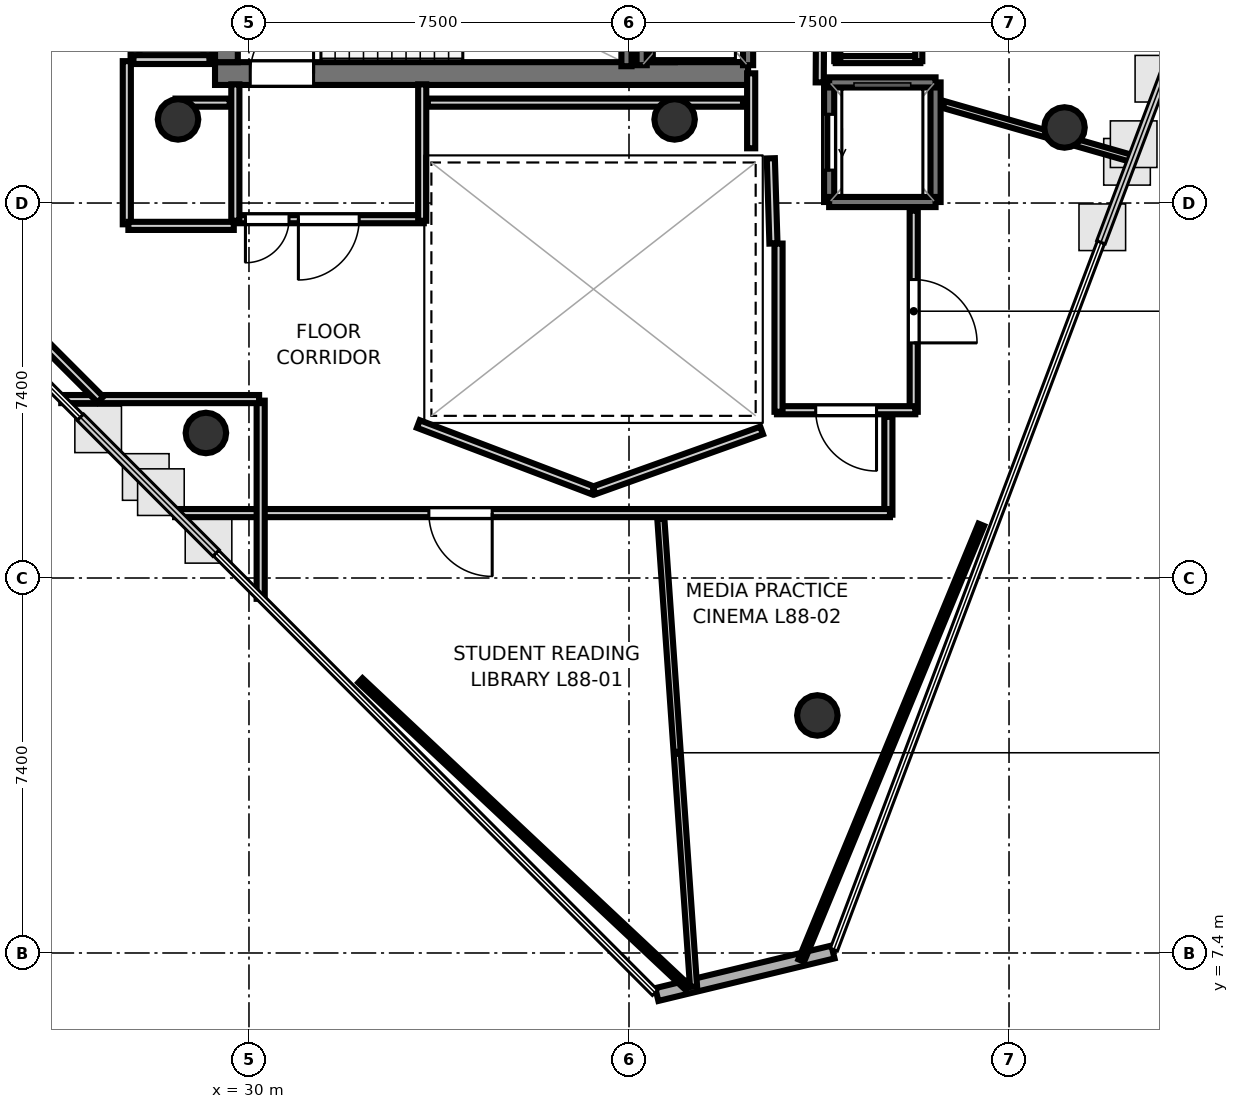
"""IFC4 building model, lengths in metres.
Left out: names, types, materials, properties, quantities, classifications, styles, units other than length and angle.
Written with IfcOpenShell. Run it as: python <this file> out.ifc"""

import sys

from ifc_helpers import new_model, si_unit, direction, frame, frame_2d, origin, origin_2d, place, context, subcontext, project, spatial, rectangle, hollow_circle, extrude, element, fill, save


model = new_model("IFC4")
c1 = context("Model", 3, precision=1e-05, world=origin(), true_north=direction((0.0, 1.0)))
c2 = subcontext(c1, "Body", "Model", "MODEL_VIEW")
j1 = project(units=[si_unit("LENGTHUNIT", "METRE"), si_unit("PLANEANGLEUNIT", "RADIAN")], contexts=[c1])
p1 = place(None, origin())
s1 = spatial("IfcSite", under=j1, at=p1, CompositionType="ELEMENT")
p2 = place(p1, origin())
s2 = spatial("IfcBuilding", under=s1, at=p2, CompositionType="ELEMENT")
p3 = place(p2, frame((0.0, 0.0, 340.7)))
s3 = spatial("IfcBuildingStorey", under=s2, at=p3, CompositionType="ELEMENT", Elevation=340.7)
p4 = place(p3, frame((29.33, 24.755, 0.0), z_axis=(0.0, 0.0, 1.0), x_axis=(1.0, 0.0, 0.0)))
e1 = element("IfcWall", 1, at=p4, inside=s3, PredefinedType="SHEAR", context=c2, shape_type="SweptSolid", body=[
    extrude(rectangle(XDim=10.52, YDim=0.45, at=frame_2d((5.26, 0.0))), origin(), (0.0, 0.0, 1.0), 3.52),
])
p5 = place(p4, frame((0.695, 0.0, 0.0)))
e2 = element("IfcOpeningElement", 2, at=p5, cuts=e1, PredefinedType="OPENING", context=c2, shape_type="SweptSolid", body=[
    extrude(rectangle(XDim=1.25, YDim=2.15, at=frame_2d((0.625, 1.075))), frame((0.0, 0.235, 0.0), z_axis=(0.0, -1.0, 0.0), x_axis=(1.0, 0.0, 0.0)), (0.0, 0.0, 1.0), 0.47),
])
for number, where, z_axis, x_axis in (
    (3, (29.555, 24.98, 0.0), (0.0, 0.0, 1.0), (0.0, 1.0, 0.0)),
    (4, (38.18, 24.98, 0.0), (0.0, 0.0, 1.0), (0.0, 1.0, 0.0)),
):
    element("IfcWall", number, at=place(p3, frame(where, z_axis=z_axis, x_axis=x_axis)), inside=s3, PredefinedType="SHEAR", context=c2, shape_type="SweptSolid", body=[
        extrude(rectangle(XDim=7.44, YDim=0.45, at=frame_2d((3.72, 0.0))), origin(), (0.0, 0.0, 1.0), 3.52),
    ])
for number, where, z_axis, x_axis in (
    (5, (28.6, 23.85, 0.0), (0.0, 0.0, 1.0), (1.0, 0.0, 0.0)),
    (6, (38.4, 23.85, 0.0), (0.0, 0.0, 1.0), (1.0, 0.0, 0.0)),
    (7, (29.15, 17.662, 0.0), (0.0, 0.0, 1.0), (1.0, 0.0, 0.0)),
    (8, (41.217, 12.088, 0.0), (0.0, 0.0, 1.0), (1.0, 0.0, 0.0)),
    (9, (46.095, 23.691, 0.0), (0.0, 0.0, 1.0), (1.0, 0.0, 0.0)),
):
    element("IfcColumn", number, at=place(p3, frame(where, z_axis=z_axis, x_axis=x_axis)), inside=s3, PredefinedType="COLUMN", context=c2, shape_type="SweptSolid", body=[
        extrude(hollow_circle(Radius=0.4, WallThickness=0.022, at=origin_2d()), origin(), (0.0, 0.0, 1.0), 3.7),
    ])
p6 = place(p3, frame((38.049, 6.58, 0.0), z_axis=(0.0, 0.0, 1.0), x_axis=(0.972070395477, 0.234689467672, 0.0)))
e10 = element("IfcWall", 10, at=p6, inside=s3, PredefinedType="SOLIDWALL", context=c2, shape_type="SweptSolid", body=[
    extrude(rectangle(XDim=3.576, YDim=0.26, at=frame_2d((1.788, 0.0))), origin(), (0.0, 0.0, 1.0), 3.52),
])
p7 = place(p3, frame((37.45, 24.9, 0.0), z_axis=(0.0, 0.0, 1.0), x_axis=(0.0, 1.0, 0.0)))
e11 = element("IfcWall", 11, at=p7, inside=s3, PredefinedType="SOLIDWALL", context=c2, shape_type="SweptSolid", body=[
    extrude(rectangle(XDim=3.06, YDim=0.2, at=frame_2d((1.53, 0.0))), origin(), (0.0, 0.0, 1.0), 3.52),
])
p8 = place(p3, frame((39.85, 24.92, 0.0), z_axis=(0.0, 0.0, 1.0), x_axis=(0.0, 1.0, 0.0)))
e12 = element("IfcWall", 12, at=p8, inside=s3, PredefinedType="SOLIDWALL", context=c2, shape_type="SweptSolid", body=[
    extrude(rectangle(XDim=2.36, YDim=0.2, at=frame_2d((1.18, 0.0))), origin(), (0.0, 0.0, 1.0), 3.52),
])
p9 = place(p8, frame((0.63, 0.0, 0.0)))
e13 = element("IfcOpeningElement", 13, at=p9, cuts=e12, PredefinedType="OPENING", context=c2, shape_type="SweptSolid", body=[
    extrude(rectangle(XDim=1.1, YDim=2.15, at=frame_2d((0.55, 1.075))), frame((0.0, 0.11, 0.0), z_axis=(0.0, -1.0, 0.0), x_axis=(1.0, 0.0, 0.0)), (0.0, 0.0, 1.0), 0.22),
])
for number, where, z_axis, x_axis in (
    (14, (37.75, 24.92, 0.0), (0.0, 0.0, 1.0), (0.0, 1.0, 0.0)),
    (15, (43.55, 22.22, 0.0), (0.0, 0.0, 1.0), (0.0, 1.0, 0.0)),
):
    element("IfcWall", number, at=place(p3, frame(where, z_axis=z_axis, x_axis=x_axis)), inside=s3, PredefinedType="SOLIDWALL", context=c2, shape_type="SweptSolid", body=[
        extrude(rectangle(XDim=2.36, YDim=0.2, at=frame_2d((1.18, 0.0))), origin(), (0.0, 0.0, 1.0), 3.52),
    ])
p10 = place(p3, frame((41.45, 22.22, 0.0), z_axis=(0.0, 0.0, 1.0), x_axis=(0.0, 1.0, 0.0)))
e16 = element("IfcWall", 16, at=p10, inside=s3, PredefinedType="SOLIDWALL", context=c2, shape_type="SweptSolid", body=[
    extrude(rectangle(XDim=2.36, YDim=0.2, at=frame_2d((1.18, 0.0))), origin(), (0.0, 0.0, 1.0), 3.52),
])
p11 = place(p10, frame((0.63, 0.0, 0.0)))
e17 = element("IfcOpeningElement", 17, at=p11, cuts=e16, PredefinedType="OPENING", context=c2, shape_type="SweptSolid", body=[
    extrude(rectangle(XDim=1.1, YDim=2.15, at=frame_2d((0.55, 1.075))), frame((0.0, 0.11, 0.0), z_axis=(0.0, -1.0, 0.0), x_axis=(1.0, 0.0, 0.0)), (0.0, 0.0, 1.0), 0.22),
])
for number, where, z_axis, x_axis in (
    (18, (41.45, 24.58, 0.0), (0.0, 0.0, 1.0), (1.0, 0.0, 0.0)),
    (19, (41.45, 22.22, 0.0), (0.0, 0.0, 1.0), (1.0, 0.0, 0.0)),
):
    element("IfcWall", number, at=place(p3, frame(where, z_axis=z_axis, x_axis=x_axis)), inside=s3, PredefinedType="SOLIDWALL", context=c2, shape_type="SweptSolid", body=[
        extrude(rectangle(XDim=2.1, YDim=0.2, at=frame_2d((1.05, 0.0))), origin(), (0.0, 0.0, 1.0), 3.52),
    ])
p12 = place(p3, frame((33.45, 21.881, 0.0), z_axis=(0.0, 0.0, 1.0), x_axis=(-1.0, 0.0, 0.0)))
e20 = element("IfcWall", 20, at=p12, inside=s3, PredefinedType="PARTITIONING", context=c2, shape_type="SweptSolid", body=[
    extrude(rectangle(XDim=3.75, YDim=0.16, at=frame_2d((1.875, 0.0))), origin(), (0.0, 0.0, 1.0), 2.84),
])
p13 = place(p12, frame((1.275, 0.0, 0.0)))
e21 = element("IfcOpeningElement", 21, at=p13, cuts=e20, PredefinedType="OPENING", context=c2, shape_type="SweptSolid", body=[
    extrude(rectangle(XDim=1.2, YDim=2.15, at=frame_2d((0.6, 1.075))), frame((0.0, 0.09, 0.0), z_axis=(0.0, -1.0, 0.0), x_axis=(1.0, 0.0, 0.0)), (0.0, 0.0, 1.0), 0.18),
])
p14 = place(p12, frame((2.66, 0.0, 0.0)))
e22 = element("IfcOpeningElement", 22, at=p14, cuts=e20, PredefinedType="OPENING", context=c2, shape_type="SweptSolid", body=[
    extrude(rectangle(XDim=0.86, YDim=2.05, at=frame_2d((0.43, 1.025))), frame((0.0, 0.09, 0.0), z_axis=(0.0, -1.0, 0.0), x_axis=(1.0, 0.0, 0.0)), (0.0, 0.0, 1.0), 0.18),
])
for number, where, z_axis, x_axis in (
    (23, (29.731, 21.85, 0.0), (0.0, 0.0, 1.0), (0.0, 1.0, 0.0)),
    (24, (33.419, 24.542, 0.0), (0.0, 0.0, 1.0), (0.0, -1.0, 0.0)),
):
    element("IfcWall", number, at=place(p3, frame(where, z_axis=z_axis, x_axis=x_axis)), inside=s3, PredefinedType="PARTITIONING", context=c2, shape_type="SweptSolid", body=[
        extrude(rectangle(XDim=2.692, YDim=0.16, at=frame_2d((1.346, 0.0))), origin(), (0.0, 0.0, 1.0), 2.84),
    ])
p15 = place(p3, frame((40.351, 21.401, 0.0), z_axis=(0.0, 0.0, 1.0), x_axis=(-0.031058045979, 0.999517582527, 0.0)))
e25 = element("IfcWall", 25, at=p15, inside=s3, PredefinedType="PARTITIONING", context=c2, shape_type="SweptSolid", body=[
    extrude(rectangle(XDim=1.682, YDim=0.16, at=frame_2d((0.841, 0.0))), origin(), (0.0, 0.0, 1.0), 2.84),
])
p16 = place(p3, frame((39.911, 23.28, 0.0), z_axis=(0.0, 0.0, 1.0), x_axis=(0.0, 1.0, 0.0)))
e26 = element("IfcWall", 26, at=p16, inside=s3, PredefinedType="PARTITIONING", context=c2, shape_type="SweptSolid", body=[
    extrude(rectangle(XDim=1.48, YDim=0.16, at=frame_2d((0.74, 0.0))), origin(), (0.0, 0.0, 1.0), 2.84),
])
p17 = place(p3, frame((41.313, 32.92, 0.0), z_axis=(0.0, 0.0, 1.0), x_axis=(-0.005942518022, -0.999982343084, 0.0)))
e27 = element("IfcWall", 27, at=p17, inside=s3, PredefinedType="PARTITIONING", context=c2, shape_type="SweptSolid", body=[
    extrude(rectangle(XDim=8.34, YDim=0.16, at=frame_2d((4.17, 0.0))), origin(), (0.0, 0.0, 1.0), 2.84),
])
p18 = place(p3, frame((43.119, 22.05, 0.0), z_axis=(0.0, 0.0, 1.0), x_axis=(0.0, -1.0, 0.0)))
e28 = element("IfcWall", 28, at=p18, inside=s3, PredefinedType="PARTITIONING", context=c2, shape_type="SweptSolid", body=[
    extrude(rectangle(XDim=3.97, YDim=0.16, at=frame_2d((1.985, 0.0))), origin(), (0.0, 0.0, 1.0), 2.84),
])
p19 = place(p18, frame((1.36, 0.0, 0.0)))
e29 = element("IfcOpeningElement", 29, at=p19, cuts=e28, PredefinedType="OPENING", context=c2, shape_type="SweptSolid", body=[
    extrude(rectangle(XDim=1.25, YDim=2.2, at=frame_2d((0.625, 1.1))), frame((0.0, 0.09, 0.0), z_axis=(0.0, -1.0, 0.0), x_axis=(1.0, 0.0, 0.0)), (0.0, 0.0, 1.0), 0.18),
])
p20 = place(p3, frame((43.15, 18.111, 0.0), z_axis=(0.0, 0.0, 1.0), x_axis=(-1.0, 0.0, 0.0)))
e30 = element("IfcWall", 30, at=p20, inside=s3, PredefinedType="PARTITIONING", context=c2, shape_type="SweptSolid", body=[
    extrude(rectangle(XDim=2.73, YDim=0.16, at=frame_2d((1.365, 0.0))), origin(), (0.0, 0.0, 1.0), 2.84),
])
p21 = place(p20, frame((0.765, 0.0, 0.0)))
e31 = element("IfcOpeningElement", 31, at=p21, cuts=e30, PredefinedType="OPENING", context=c2, shape_type="SweptSolid", body=[
    extrude(rectangle(XDim=1.2, YDim=2.15, at=frame_2d((0.6, 1.075))), frame((0.0, 0.09, 0.0), z_axis=(0.0, -1.0, 0.0), x_axis=(1.0, 0.0, 0.0)), (0.0, 0.0, 1.0), 0.18),
])
p22 = place(p3, frame((40.451, 18.08, 0.0), z_axis=(0.0, 0.0, 1.0), x_axis=(0.0, 1.0, 0.0)))
e32 = element("IfcWall", 32, at=p22, inside=s3, PredefinedType="PARTITIONING", context=c2, shape_type="SweptSolid", body=[
    extrude(rectangle(XDim=3.32, YDim=0.16, at=frame_2d((1.66, 0.0))), origin(), (0.0, 0.0, 1.0), 2.84),
])
p23 = place(p3, frame((43.25, 25.031, 0.0), z_axis=(0.0, 0.0, 1.0), x_axis=(-1.0, 0.0, 0.0)))
e33 = element("IfcWall", 33, at=p23, inside=s3, PredefinedType="PARTITIONING", context=c2, shape_type="SweptSolid", body=[
    extrude(rectangle(XDim=1.67, YDim=0.14, at=frame_2d((0.835, 0.0))), origin(), (0.0, 0.0, 1.0), 2.84),
])
p24 = place(p3, frame((41.611, 25.0, 0.0), z_axis=(0.0, 0.0, 1.0), x_axis=(0.0, 1.0, 0.0)))
e34 = element("IfcWall", 34, at=p24, inside=s3, PredefinedType="PARTITIONING", context=c2, shape_type="SweptSolid", body=[
    extrude(rectangle(XDim=2.95, YDim=0.12, at=frame_2d((1.475, 0.0))), origin(), (0.0, 0.0, 1.0), 2.84),
])
p25 = place(p3, frame((43.219, 27.95, 0.0), z_axis=(0.0, 0.0, 1.0), x_axis=(0.0, -1.0, 0.0)))
e35 = element("IfcWall", 35, at=p25, inside=s3, PredefinedType="PARTITIONING", context=c2, shape_type="SweptSolid", body=[
    extrude(rectangle(XDim=2.95, YDim=0.14, at=frame_2d((1.475, 0.0))), origin(), (0.0, 0.0, 1.0), 2.84),
])
p26 = place(p25, frame((0.985, 0.0, 0.0)))
e36 = element("IfcOpeningElement", 36, at=p26, cuts=e35, PredefinedType="OPENING", context=c2, shape_type="SweptSolid", body=[
    extrude(rectangle(XDim=0.98, YDim=2.1, at=frame_2d((0.49, 1.05))), frame((0.0, 0.08, 0.0), z_axis=(0.0, -1.0, 0.0), x_axis=(1.0, 0.0, 0.0)), (0.0, 0.0, 1.0), 0.16),
])
p27 = place(p3, frame((27.751, 25.0, 0.0), z_axis=(0.0, 0.0, 1.0), x_axis=(0.0, 1.0, 0.0)))
e37 = element("IfcWall", 37, at=p27, inside=s3, PredefinedType="PLUMBINGWALL", context=c2, shape_type="SweptSolid", body=[
    extrude(rectangle(XDim=4.12, YDim=0.175, at=frame_2d((2.06, 0.0))), origin(), (0.0, 0.0, 1.0), 2.84),
])
p28 = place(p27, frame((1.61, 0.0, 0.0)))
e38 = element("IfcOpeningElement", 38, at=p28, cuts=e37, PredefinedType="OPENING", context=c2, shape_type="SweptSolid", body=[
    extrude(rectangle(XDim=0.9, YDim=2.1, at=frame_2d((0.45, 1.05))), frame((0.0, 0.097, 0.0), z_axis=(0.0, -1.0, 0.0), x_axis=(1.0, 0.0, 0.0)), (0.0, 0.0, 1.0), 0.195),
])
p29 = place(p3, frame((29.189, 29.12, 0.0), z_axis=(0.0, 0.0, 1.0), x_axis=(0.0, -1.0, 0.0)))
e39 = element("IfcWall", 39, at=p29, inside=s3, PredefinedType="PLUMBINGWALL", context=c2, shape_type="SweptSolid", body=[
    extrude(rectangle(XDim=4.12, YDim=0.175, at=frame_2d((2.06, 0.0))), origin(), (0.0, 0.0, 1.0), 2.84),
])
p30 = place(p3, frame((29.22, 25.031, 0.0), z_axis=(0.0, 0.0, 1.0), x_axis=(-1.0, 0.0, 0.0)))
e40 = element("IfcWall", 40, at=p30, inside=s3, PredefinedType="PLUMBINGWALL", context=c2, shape_type="SweptSolid", body=[
    extrude(rectangle(XDim=1.5, YDim=0.175, at=frame_2d((0.75, 0.0))), origin(), (0.0, 0.0, 1.0), 2.84),
])
p31 = place(p3, frame((29.62, 24.181, 0.0), z_axis=(0.0, 0.0, 1.0), x_axis=(-1.0, 0.0, 0.0)))
e41 = element("IfcWall", 41, at=p31, inside=s3, PredefinedType="PARTITIONING", context=c2, shape_type="SweptSolid", body=[
    extrude(rectangle(XDim=1.07, YDim=0.16, at=frame_2d((0.535, 0.0))), origin(), (0.0, 0.0, 1.0), 2.84),
])
p32 = place(p3, frame((39.75, 24.181, 0.0), z_axis=(0.0, 0.0, 1.0), x_axis=(-1.0, 0.0, 0.0)))
e42 = element("IfcWall", 42, at=p32, inside=s3, PredefinedType="PARTITIONING", context=c2, shape_type="SweptSolid", body=[
    extrude(rectangle(XDim=6.22, YDim=0.16, at=frame_2d((3.11, 0.0))), origin(), (0.0, 0.0, 1.0), 2.84),
])
p33 = place(p3, frame((36.81, 16.529, 0.0), z_axis=(0.0, 0.0, 1.0), x_axis=(0.941548344365, 0.33687789364, 0.0)))
e43 = element("IfcWall", 43, at=p33, inside=s3, PredefinedType="PARTITIONING", context=c2, shape_type="SweptSolid", body=[
    extrude(rectangle(XDim=3.513, YDim=0.16, at=frame_2d((1.756, 0.0))), origin(), (0.0, 0.0, 1.0), 2.84),
])
p34 = place(p3, frame((42.619, 17.98, 0.0), z_axis=(0.0, 0.0, 1.0), x_axis=(0.0, -1.0, 0.0)))
e44 = element("IfcWall", 44, at=p34, inside=s3, PredefinedType="PARTITIONING", context=c2, shape_type="SweptSolid", body=[
    extrude(rectangle(XDim=1.93, YDim=0.16, at=frame_2d((0.965, 0.0))), origin(), (0.0, 0.0, 1.0), 2.84),
])
p35 = place(p3, frame((42.65, 16.081, 0.0), z_axis=(0.0, 0.0, 1.0), x_axis=(-1.0, 0.0, 0.0)))
e45 = element("IfcWall", 45, at=p35, inside=s3, PredefinedType="PARTITIONING", context=c2, shape_type="SweptSolid", body=[
    extrude(rectangle(XDim=14.108, YDim=0.16, at=frame_2d((7.054, 0.0))), origin(), (0.0, 0.0, 1.0), 2.84),
])
p36 = place(p35, frame((7.85, 0.0, 0.0)))
e46 = element("IfcOpeningElement", 46, at=p36, cuts=e45, PredefinedType="OPENING", context=c2, shape_type="SweptSolid", body=[
    extrude(rectangle(XDim=1.25, YDim=2.2, at=frame_2d((0.625, 1.1))), frame((0.0, 0.09, 0.0), z_axis=(0.0, -1.0, 0.0), x_axis=(1.0, 0.0, 0.0)), (0.0, 0.0, 1.0), 0.18),
])
p37 = place(p3, frame((30.231, 14.389, 0.0), z_axis=(0.0, 0.0, 1.0), x_axis=(0.0, 1.0, 0.0)))
e47 = element("IfcWall", 47, at=p37, inside=s3, PredefinedType="PARTITIONING", context=c2, shape_type="SweptSolid", body=[
    extrude(rectangle(XDim=3.911, YDim=0.16, at=frame_2d((1.955, 0.0))), origin(), (0.0, 0.0, 1.0), 2.84),
])
p38 = place(p3, frame((30.2, 18.331, 0.0), z_axis=(0.0, 0.0, 1.0), x_axis=(-1.0, 0.0, 0.0)))
e48 = element("IfcWall", 48, at=p38, inside=s3, PredefinedType="PARTITIONING", context=c2, shape_type="SweptSolid", body=[
    extrude(rectangle(XDim=3.905, YDim=0.16, at=frame_2d((1.953, 0.0))), origin(), (0.0, 0.0, 1.0), 2.84),
])
p39 = place(p3, frame((27.067, 18.322, 0.0), z_axis=(0.0, 0.0, 1.0), x_axis=(-0.706612041623, 0.707601174839, 0.0)))
e49 = element("IfcWall", 49, at=p39, inside=s3, PredefinedType="PARTITIONING", context=c2, shape_type="SweptSolid", body=[
    extrude(rectangle(XDim=1.975, YDim=0.16, at=frame_2d((0.987, 0.0))), origin(), (0.0, 0.0, 1.0), 2.84),
])
p40 = place(p3, frame((27.589, 25.0, 0.0), z_axis=(0.0, 0.0, 1.0), x_axis=(0.0, -1.0, 0.0)))
e50 = element("IfcWall", 50, at=p40, inside=s3, PredefinedType="PARTITIONING", context=c2, shape_type="SweptSolid", body=[
    extrude(rectangle(XDim=3.22, YDim=0.16, at=frame_2d((1.61, 0.0))), origin(), (0.0, 0.0, 1.0), 2.84),
])
p41 = place(p3, frame((27.62, 21.749, 0.0), z_axis=(0.0, 0.0, 1.0), x_axis=(1.0, 0.0, 0.0)))
e51 = element("IfcWall", 51, at=p41, inside=s3, PredefinedType="PARTITIONING", context=c2, shape_type="SweptSolid", body=[
    extrude(rectangle(XDim=2.08, YDim=0.16, at=frame_2d((1.04, 0.0))), origin(), (0.0, 0.0, 1.0), 2.84),
])
p42 = place(p3, frame((33.342, 17.839, 0.0), z_axis=(0.0, 0.0, 1.0), x_axis=(0.93476643205, -0.355262885076, 0.0)))
e52 = element("IfcWall", 52, at=p42, inside=s3, PredefinedType="PARTITIONING", context=c2, shape_type="SweptSolid", body=[
    extrude(rectangle(XDim=3.688, YDim=0.16, at=frame_2d((1.844, 0.0))), origin(), (0.0, 0.0, 1.0), 2.84),
])
p43 = place(p3, frame((38.128, 15.968, 0.0), z_axis=(0.0, 0.0, 1.0), x_axis=(0.06974355432, -0.99756495359, 0.0)))
e53 = element("IfcWall", 53, at=p43, inside=s3, PredefinedType="PARTITIONING", context=c2, shape_type="SweptSolid", body=[
    extrude(rectangle(XDim=9.255, YDim=0.14, at=frame_2d((4.628, 0.0))), origin(), (0.0, 0.0, 1.0), 2.84),
])
p44 = place(p3, frame((38.662, 6.711, 0.0), z_axis=(0.0, 0.0, 1.0), x_axis=(-0.729077520638, 0.684431127946, 0.0)))
e54 = element("IfcWall", 54, at=p44, inside=s3, PredefinedType="PARTITIONING", context=c2, shape_type="SweptSolid", body=[
    extrude(rectangle(XDim=8.864, YDim=0.12, at=frame_2d((4.432, 0.0))), origin(), (0.0, 0.0, 1.0), 2.84),
])
p45 = place(p3, frame((43.711, 24.143, 0.0), z_axis=(0.0, 0.0, 1.0), x_axis=(0.9612562867, -0.275656219374, 0.0)))
e55 = element("IfcWall", 55, at=p45, inside=s3, PredefinedType="PARTITIONING", context=c2, shape_type="SweptSolid", body=[
    extrude(rectangle(XDim=3.896, YDim=0.14, at=frame_2d((1.948, 0.0))), origin(), (0.0, 0.0, 1.0), 2.84),
])
p46 = place(p3, frame((44.453, 15.85, 0.0), z_axis=(0.0, 0.0, 1.0), x_axis=(-0.381841049449, -0.924228009181, 0.0)))
e56 = element("IfcWall", 56, at=p46, inside=s3, PredefinedType="PARTITIONING", context=c2, shape_type="SweptSolid", body=[
    extrude(rectangle(XDim=9.303, YDim=0.12, at=frame_2d((4.652, 0.0))), origin(), (0.0, 0.0, 1.0), 2.84),
])
p47 = place(p5, origin())
e57 = element("IfcDoor", 57, at=p47, inside=s3, OperationType="SINGLE_SWING_RIGHT", PredefinedType="DOOR", context=c2, shape_type="SweptSolid", body=[
    extrude(rectangle(XDim=1.25, YDim=2.15, at=frame_2d((0.625, 1.075))), frame((0.0, 0.025, 0.0), z_axis=(0.0, -1.0, 0.0), x_axis=(1.0, 0.0, 0.0)), (0.0, 0.0, 1.0), 0.05),
])
fill(e2, e57)
p48 = place(p11, origin())
e58 = element("IfcDoor", 58, at=p48, inside=s3, OperationType="SLIDING_TO_LEFT", PredefinedType="DOOR", context=c2, shape_type="SweptSolid", body=[
    extrude(rectangle(XDim=1.1, YDim=2.15, at=frame_2d((0.55, 1.075))), frame((0.0, 0.025, 0.0), z_axis=(0.0, -1.0, 0.0), x_axis=(1.0, 0.0, 0.0)), (0.0, 0.0, 1.0), 0.05),
])
fill(e17, e58)
p49 = place(p13, origin())
e59 = element("IfcDoor", 59, at=p49, inside=s3, OperationType="SINGLE_SWING_RIGHT", PredefinedType="DOOR", context=c2, shape_type="SweptSolid", body=[
    extrude(rectangle(XDim=1.2, YDim=2.15, at=frame_2d((0.6, 1.075))), frame((0.0, 0.025, 0.0), z_axis=(0.0, -1.0, 0.0), x_axis=(1.0, 0.0, 0.0)), (0.0, 0.0, 1.0), 0.05),
])
fill(e21, e59)
p50 = place(p21, origin())
e60 = element("IfcDoor", 60, at=p50, inside=s3, OperationType="SINGLE_SWING_LEFT", PredefinedType="DOOR", context=c2, shape_type="SweptSolid", body=[
    extrude(rectangle(XDim=1.2, YDim=2.15, at=frame_2d((0.6, 1.075))), frame((0.0, 0.025, 0.0), z_axis=(0.0, -1.0, 0.0), x_axis=(1.0, 0.0, 0.0)), (0.0, 0.0, 1.0), 0.05),
])
fill(e31, e60)
p51 = place(p14, origin())
e61 = element("IfcDoor", 61, at=p51, inside=s3, OperationType="SINGLE_SWING_RIGHT", PredefinedType="DOOR", context=c2, shape_type="SweptSolid", body=[
    extrude(rectangle(XDim=0.86, YDim=2.05, at=frame_2d((0.43, 1.025))), frame((0.0, 0.025, 0.0), z_axis=(0.0, -1.0, 0.0), x_axis=(1.0, 0.0, 0.0)), (0.0, 0.0, 1.0), 0.05),
])
fill(e22, e61)
p52 = place(p36, origin())
e62 = element("IfcDoor", 62, at=p52, inside=s3, OperationType="SINGLE_SWING_LEFT", PredefinedType="DOOR", context=c2, shape_type="SweptSolid", body=[
    extrude(rectangle(XDim=1.25, YDim=2.2, at=frame_2d((0.625, 1.1))), frame((0.0, 0.025, 0.0), z_axis=(0.0, -1.0, 0.0), x_axis=(1.0, 0.0, 0.0)), (0.0, 0.0, 1.0), 0.05),
])
fill(e46, e62)
p53 = place(p19, origin())
e63 = element("IfcDoor", 63, at=p53, inside=s3, OperationType="SINGLE_SWING_RIGHT", PredefinedType="DOOR", context=c2, shape_type="SweptSolid", body=[
    extrude(rectangle(XDim=1.25, YDim=2.2, at=frame_2d((0.625, 1.1))), frame((0.0, 0.025, 0.0), z_axis=(0.0, -1.0, 0.0), x_axis=(1.0, 0.0, 0.0)), (0.0, 0.0, 1.0), 0.05),
])
fill(e29, e63)
save(model, sys.argv[1])
